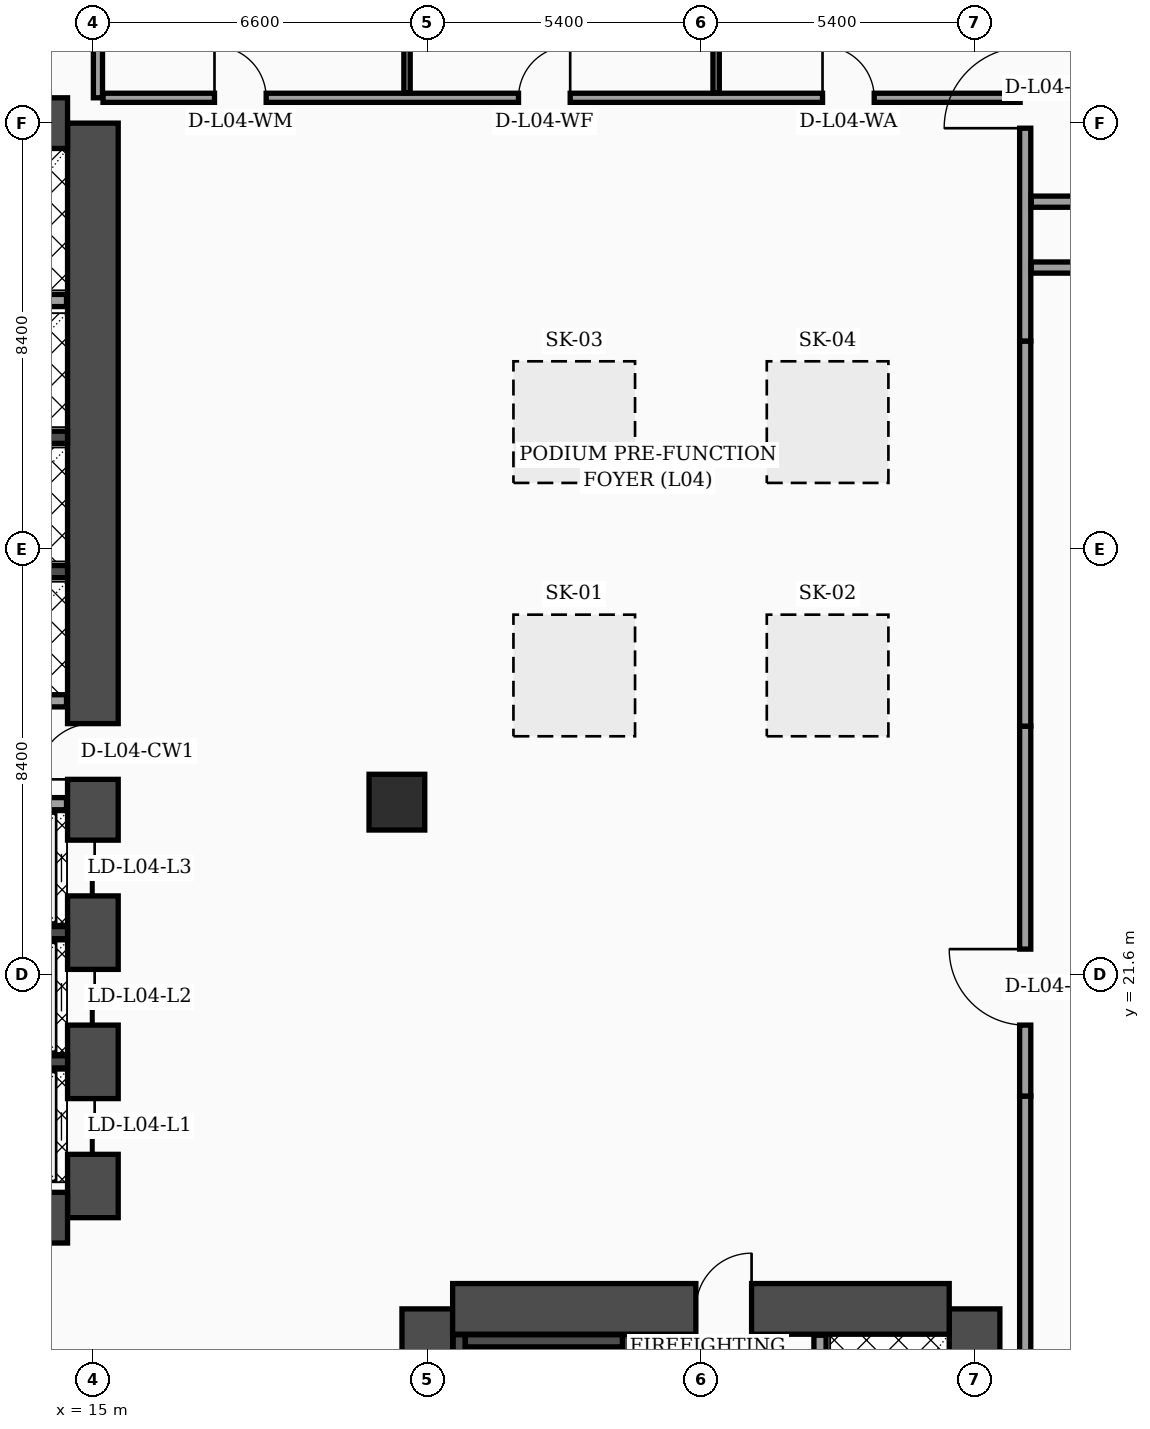
"""IFC4 building model, lengths in metres.
Left out: names, types, materials, properties, quantities, classifications, styles, units other than length and angle.
Written with IfcOpenShell. Run it as: python <this file> out.ifc"""

import sys

from ifc_helpers import new_model, si_unit, direction, frame, frame_2d, origin, origin_2d, place, context, subcontext, project, spatial, rectangle, hollow_rectangle, extrude, element, fill, save


model = new_model("IFC4")
c1 = context("Model", 3, precision=1e-05, world=origin(), true_north=direction((0.0, 1.0)))
c2 = subcontext(c1, "Body", "Model", "MODEL_VIEW")
j1 = project(units=[si_unit("LENGTHUNIT", "METRE"), si_unit("PLANEANGLEUNIT", "RADIAN")], contexts=[c1])
p1 = place(None, origin())
s1 = spatial("IfcSite", under=j1, at=p1, CompositionType="ELEMENT")
p2 = place(p1, origin())
s2 = spatial("IfcBuilding", under=s1, at=p2, CompositionType="ELEMENT")
p3 = place(p2, frame((0.0, 0.0, 22.0)))
s3 = spatial("IfcBuildingStorey", under=s2, at=p3, CompositionType="ELEMENT", Elevation=22.0)
p4 = place(p3, frame((15.0, 16.8, 0.0), z_axis=(0.0, 0.0, 1.0), x_axis=(0.0, 1.0, 0.0)))
e1 = element("IfcWall", 1, at=p4, inside=s3, PredefinedType="SHEAR", context=c2, shape_type="SweptSolid", body=[
    extrude(rectangle(XDim=21.6, YDim=1.0, at=frame_2d((10.8, 0.0))), origin(), (0.0, 0.0, 1.0), 4.76),
])
p5 = place(p4, frame((8.65, 0.0, 0.0)))
e2 = element("IfcOpeningElement", 2, at=p5, cuts=e1, PredefinedType="OPENING", context=c2, shape_type="SweptSolid", body=[
    extrude(rectangle(XDim=1.1, YDim=2.2, at=frame_2d((0.55, 1.1))), frame((0.0, 0.51, 0.0), z_axis=(0.0, -1.0, 0.0), x_axis=(1.0, 0.0, 0.0)), (0.0, 0.0, 1.0), 1.02),
])
p6 = place(p4, frame((1.25, 0.0, 0.0)))
e3 = element("IfcOpeningElement", 3, at=p6, cuts=e1, PredefinedType="OPENING", context=c2, shape_type="SweptSolid", body=[
    extrude(rectangle(XDim=1.1, YDim=2.2, at=frame_2d((0.55, 1.1))), frame((0.0, 0.51, 0.0), z_axis=(0.0, -1.0, 0.0), x_axis=(1.0, 0.0, 0.0)), (0.0, 0.0, 1.0), 1.02),
])
p7 = place(p4, frame((3.8, 0.0, 0.0)))
e4 = element("IfcOpeningElement", 4, at=p7, cuts=e1, PredefinedType="OPENING", context=c2, shape_type="SweptSolid", body=[
    extrude(rectangle(XDim=1.1, YDim=2.2, at=frame_2d((0.55, 1.1))), frame((0.0, 0.51, 0.0), z_axis=(0.0, -1.0, 0.0), x_axis=(1.0, 0.0, 0.0)), (0.0, 0.0, 1.0), 1.02),
])
p8 = place(p4, frame((6.35, 0.0, 0.0)))
e5 = element("IfcOpeningElement", 5, at=p8, cuts=e1, PredefinedType="OPENING", context=c2, shape_type="SweptSolid", body=[
    extrude(rectangle(XDim=1.1, YDim=2.2, at=frame_2d((0.55, 1.1))), frame((0.0, 0.51, 0.0), z_axis=(0.0, -1.0, 0.0), x_axis=(1.0, 0.0, 0.0)), (0.0, 0.0, 1.0), 1.02),
])
for number, where, z_axis, x_axis in (
    (6, (4.7, 38.4, 0.0), (0.0, 0.0, 1.0), (1.0, 0.0, 0.0)),
    (7, (4.7, 16.8, 0.0), (0.0, 0.0, 1.0), (1.0, 0.0, 0.0)),
):
    element("IfcWall", number, at=place(p3, frame(where, z_axis=z_axis, x_axis=x_axis)), inside=s3, PredefinedType="SHEAR", context=c2, shape_type="SweptSolid", body=[
        extrude(rectangle(XDim=9.8, YDim=1.0, at=frame_2d((4.9, 0.0))), origin(), (0.0, 0.0, 1.0), 4.76),
    ])
for number, where, z_axis, x_axis in (
    (8, (21.6, 4.6, 0.0), (0.0, 0.0, 1.0), (0.0, 1.0, 0.0)),
    (9, (32.4, 4.6, 0.0), (0.0, 0.0, 1.0), (0.0, 1.0, 0.0)),
):
    element("IfcWall", number, at=place(p3, frame(where, z_axis=z_axis, x_axis=x_axis)), inside=s3, PredefinedType="SHEAR", context=c2, shape_type="SweptSolid", body=[
        extrude(rectangle(XDim=10.4, YDim=1.0, at=frame_2d((5.2, 0.0))), origin(), (0.0, 0.0, 1.0), 4.76),
    ])
p9 = place(p3, frame((22.1, 15.0, 0.0), z_axis=(0.0, 0.0, 1.0), x_axis=(1.0, 0.0, 0.0)))
e10 = element("IfcWall", 10, at=p9, inside=s3, PredefinedType="SHEAR", context=c2, shape_type="SweptSolid", body=[
    extrude(rectangle(XDim=9.8, YDim=1.0, at=frame_2d((4.9, 0.0))), origin(), (0.0, 0.0, 1.0), 4.76),
])
p10 = place(p9, frame((4.8, 0.0, 0.0)))
e11 = element("IfcOpeningElement", 11, at=p10, cuts=e10, PredefinedType="OPENING", context=c2, shape_type="SweptSolid", body=[
    extrude(rectangle(XDim=1.1, YDim=2.2, at=frame_2d((0.55, 1.1))), frame((0.0, 0.51, 0.0), z_axis=(0.0, -1.0, 0.0), x_axis=(1.0, 0.0, 0.0)), (0.0, 0.0, 1.0), 1.02),
])
p11 = place(p3, frame((22.23, 5.1, 0.0), z_axis=(0.0, 0.0, 1.0), x_axis=(0.0, 1.0, 0.0)))
e12 = element("IfcWall", 12, at=p11, inside=s3, PredefinedType="SOLIDWALL", context=c2, shape_type="SweptSolid", body=[
    extrude(rectangle(XDim=9.39, YDim=0.24, at=frame_2d((4.695, 0.0))), origin(), (0.0, 0.0, 1.0), 4.76),
])
p12 = place(p3, frame((25.57, 5.1, 0.0), z_axis=(0.0, 0.0, 1.0), x_axis=(0.0, 1.0, 0.0)))
e13 = element("IfcWall", 13, at=p12, inside=s3, PredefinedType="SOLIDWALL", context=c2, shape_type="SweptSolid", body=[
    extrude(rectangle(XDim=9.39, YDim=0.24, at=frame_2d((4.695, 0.0))), origin(), (0.0, 0.0, 1.0), 4.76),
])
p13 = place(p12, frame((0.35, 0.0, 0.0)))
e14 = element("IfcOpeningElement", 14, at=p13, cuts=e13, PredefinedType="OPENING", context=c2, shape_type="SweptSolid", body=[
    extrude(rectangle(XDim=1.15, YDim=2.2, at=frame_2d((0.575, 1.1))), frame((0.0, 0.13, 0.0), z_axis=(0.0, -1.0, 0.0), x_axis=(1.0, 0.0, 0.0)), (0.0, 0.0, 1.0), 0.26),
])
p14 = place(p3, frame((22.35, 14.37, 0.0), z_axis=(0.0, 0.0, 1.0), x_axis=(1.0, 0.0, 0.0)))
e15 = element("IfcWall", 15, at=p14, inside=s3, PredefinedType="SOLIDWALL", context=c2, shape_type="SweptSolid", body=[
    extrude(rectangle(XDim=3.1, YDim=0.24, at=frame_2d((1.55, 0.0))), origin(), (0.0, 0.0, 1.0), 4.76),
])
for number, where, z_axis, x_axis in (
    (16, (12.18, 19.875, 0.0), (0.0, 0.0, 1.0), (1.0, 0.0, 0.0)),
    (17, (12.18, 22.425, 0.0), (0.0, 0.0, 1.0), (1.0, 0.0, 0.0)),
    (18, (12.18, 29.55, 0.0), (0.0, 0.0, 1.0), (1.0, 0.0, 0.0)),
    (19, (12.18, 32.2, 0.0), (0.0, 0.0, 1.0), (1.0, 0.0, 0.0)),
):
    element("IfcWall", number, at=place(p3, frame(where, z_axis=z_axis, x_axis=x_axis)), inside=s3, PredefinedType="SOLIDWALL", context=c2, shape_type="SweptSolid", body=[
        extrude(rectangle(XDim=2.32, YDim=0.24, at=frame_2d((1.16, 0.0))), origin(), (0.0, 0.0, 1.0), 4.76),
    ])
p15 = place(p3, frame((21.0, 25.0, 0.0), z_axis=(0.0, 0.0, 1.0), x_axis=(1.0, 0.0, 0.0)))
e20 = element("IfcColumn", 20, at=p15, inside=s3, PredefinedType="COLUMN", context=c2, shape_type="SweptSolid", body=[
    extrude(hollow_rectangle(XDim=1.1, YDim=1.1, WallThickness=0.045, at=origin_2d()), origin(), (0.0, 0.0, 1.0), 4.76),
])
p16 = place(p3, frame((12.15, 24.97, 0.0), z_axis=(0.0, 0.0, 1.0), x_axis=(1.0, 0.0, 0.0)))
e21 = element("IfcWall", 21, at=p16, inside=s3, PredefinedType="SOLIDWALL", context=c2, shape_type="SweptSolid", body=[
    extrude(rectangle(XDim=2.33, YDim=0.24, at=frame_2d((1.165, 0.0))), origin(), (0.0, 0.0, 1.0), 3.94),
])
p17 = place(p3, frame((12.25, 27.0, 0.0), z_axis=(0.0, 0.0, 1.0), x_axis=(1.0, 0.0, 0.0)))
e22 = element("IfcWall", 22, at=p17, inside=s3, PredefinedType="SOLIDWALL", context=c2, shape_type="SweptSolid", body=[
    extrude(rectangle(XDim=2.23, YDim=0.24, at=frame_2d((1.115, 0.0))), origin(), (0.0, 0.0, 1.0), 4.76),
])
p18 = place(p3, frame((9.66, 34.9, 0.0), z_axis=(0.0, 0.0, 1.0), x_axis=(1.0, 0.0, 0.0)))
e23 = element("IfcWall", 23, at=p18, inside=s3, PredefinedType="SOLIDWALL", context=c2, shape_type="SweptSolid", body=[
    extrude(rectangle(XDim=4.82, YDim=0.24, at=frame_2d((2.41, 0.0))), origin(), (0.0, 0.0, 1.0), 4.76),
])
p19 = place(p3, frame((29.35, 5.12, 0.0), z_axis=(0.0, 0.0, 1.0), x_axis=(0.0, 1.0, 0.0)))
e24 = element("IfcWall", 24, at=p19, inside=s3, PredefinedType="SOLIDWALL", context=c2, shape_type="SweptSolid", body=[
    extrude(rectangle(XDim=9.36, YDim=0.24, at=frame_2d((4.68, 0.0))), origin(), (0.0, 0.0, 1.0), 4.76),
])
p20 = place(p19, frame((0.55, 0.0, 0.0)))
e25 = element("IfcOpeningElement", 25, at=p20, cuts=e24, PredefinedType="OPENING", context=c2, shape_type="SweptSolid", body=[
    extrude(rectangle(XDim=1.3, YDim=2.35, at=frame_2d((0.65, 1.175))), frame((0.0, 0.13, 0.0), z_axis=(0.0, -1.0, 0.0), x_axis=(1.0, 0.0, 0.0)), (0.0, 0.0, 1.0), 0.26),
])
p21 = place(p3, frame((15.2, 38.9, 0.0), z_axis=(0.0, 0.0, 1.0), x_axis=(1.0, 0.0, 0.0)))
e26 = element("IfcWall", 26, at=p21, inside=s3, PredefinedType="PARTITIONING", context=c2, shape_type="SweptSolid", body=[
    extrude(rectangle(XDim=18.1, YDim=0.18, at=frame_2d((9.05, 0.0))), origin(), (0.0, 0.0, 1.0), 3.94),
])
p22 = place(p21, frame((2.2, 0.0, 0.0)))
e27 = element("IfcOpeningElement", 27, at=p22, cuts=e26, PredefinedType="OPENING", context=c2, shape_type="SweptSolid", body=[
    extrude(rectangle(XDim=1.02, YDim=2.2, at=frame_2d((0.51, 1.1))), frame((0.0, 0.1, 0.0), z_axis=(0.0, -1.0, 0.0), x_axis=(1.0, 0.0, 0.0)), (0.0, 0.0, 1.0), 0.2),
])
p23 = place(p21, frame((8.2, 0.0, 0.0)))
e28 = element("IfcOpeningElement", 28, at=p23, cuts=e26, PredefinedType="OPENING", context=c2, shape_type="SweptSolid", body=[
    extrude(rectangle(XDim=1.02, YDim=2.2, at=frame_2d((0.51, 1.1))), frame((0.0, 0.1, 0.0), z_axis=(0.0, -1.0, 0.0), x_axis=(1.0, 0.0, 0.0)), (0.0, 0.0, 1.0), 0.2),
])
p24 = place(p21, frame((14.2, 0.0, 0.0)))
e29 = element("IfcOpeningElement", 29, at=p24, cuts=e26, PredefinedType="OPENING", context=c2, shape_type="SweptSolid", body=[
    extrude(rectangle(XDim=1.02, YDim=2.2, at=frame_2d((0.51, 1.1))), frame((0.0, 0.1, 0.0), z_axis=(0.0, -1.0, 0.0), x_axis=(1.0, 0.0, 0.0)), (0.0, 0.0, 1.0), 0.2),
])
p25 = place(p3, frame((15.1, 38.9, 0.0), z_axis=(0.0, 0.0, 1.0), x_axis=(0.0, 1.0, 0.0)))
e30 = element("IfcWall", 30, at=p25, inside=s3, PredefinedType="PARTITIONING", context=c2, shape_type="SweptSolid", body=[
    extrude(rectangle(XDim=6.4, YDim=0.18, at=frame_2d((3.2, 0.0))), origin(), (0.0, 0.0, 1.0), 3.94),
])
p26 = place(p3, frame((21.2, 39.0, 0.0), z_axis=(0.0, 0.0, 1.0), x_axis=(0.0, 1.0, 0.0)))
e31 = element("IfcWall", 31, at=p26, inside=s3, PredefinedType="PARTITIONING", context=c2, shape_type="SweptSolid", body=[
    extrude(rectangle(XDim=6.2, YDim=0.125, at=frame_2d((3.1, 0.0))), origin(), (0.0, 0.0, 1.0), 3.94),
])
p27 = place(p3, frame((27.3, 39.0, 0.0), z_axis=(0.0, 0.0, 1.0), x_axis=(0.0, 1.0, 0.0)))
e32 = element("IfcWall", 32, at=p27, inside=s3, PredefinedType="PARTITIONING", context=c2, shape_type="SweptSolid", body=[
    extrude(rectangle(XDim=6.2, YDim=0.125, at=frame_2d((3.1, 0.0))), origin(), (0.0, 0.0, 1.0), 4.76),
])
p28 = place(p3, frame((33.4, 13.8, 0.0), z_axis=(0.0, 0.0, 1.0), x_axis=(0.0, 1.0, 0.0)))
e33 = element("IfcWall", 33, at=p28, inside=s3, PredefinedType="SOLIDWALL", context=c2, shape_type="SweptSolid", body=[
    extrude(rectangle(XDim=5.4, YDim=0.22, at=frame_2d((2.7, 0.0))), origin(), (0.0, 0.0, 1.0), 1.89),
])
p29 = place(p3, frame((33.4, 19.2, 0.0), z_axis=(0.0, 0.0, 1.0), x_axis=(0.0, 1.0, 0.0)))
e34 = element("IfcWall", 34, at=p29, inside=s3, PredefinedType="SOLIDWALL", context=c2, shape_type="SweptSolid", body=[
    extrude(rectangle(XDim=7.3, YDim=0.22, at=frame_2d((3.65, 0.0))), origin(), (0.0, 0.0, 1.0), 4.76),
])
p30 = place(p29, frame((1.4, 0.0, 0.0)))
e35 = element("IfcOpeningElement", 35, at=p30, cuts=e34, PredefinedType="OPENING", context=c2, shape_type="SweptSolid", body=[
    extrude(rectangle(XDim=1.5, YDim=2.22, at=frame_2d((0.75, 1.11))), frame((0.0, 0.12, 0.0), z_axis=(0.0, -1.0, 0.0), x_axis=(1.0, 0.0, 0.0)), (0.0, 0.0, 1.0), 0.24),
])
p31 = place(p3, frame((33.4, 26.5, 0.0), z_axis=(0.0, 0.0, 1.0), x_axis=(0.0, 1.0, 0.0)))
e36 = element("IfcWall", 36, at=p31, inside=s3, PredefinedType="SOLIDWALL", context=c2, shape_type="SweptSolid", body=[
    extrude(rectangle(XDim=7.6, YDim=0.22, at=frame_2d((3.8, 0.0))), origin(), (0.0, 0.0, 1.0), 1.89),
])
p32 = place(p3, frame((33.4, 34.1, 0.0), z_axis=(0.0, 0.0, 1.0), x_axis=(0.0, 1.0, 0.0)))
e37 = element("IfcWall", 37, at=p32, inside=s3, PredefinedType="SOLIDWALL", context=c2, shape_type="SweptSolid", body=[
    extrude(rectangle(XDim=21.34, YDim=0.22, at=frame_2d((10.67, 0.0))), origin(), (0.0, 0.0, 1.0), 3.94),
])
p33 = place(p32, frame((4.2, 0.0, 0.0)))
e38 = element("IfcOpeningElement", 38, at=p33, cuts=e37, PredefinedType="OPENING", context=c2, shape_type="SweptSolid", body=[
    extrude(rectangle(XDim=1.6, YDim=2.35, at=frame_2d((0.8, 1.175))), frame((0.0, 0.12, 0.0), z_axis=(0.0, -1.0, 0.0), x_axis=(1.0, 0.0, 0.0)), (0.0, 0.0, 1.0), 0.24),
])
p34 = place(p3, frame((33.52, 35.55, 0.0), z_axis=(0.0, 0.0, 1.0), x_axis=(1.0, 0.0, 0.0)))
e39 = element("IfcWall", 39, at=p34, inside=s3, PredefinedType="SOLIDWALL", context=c2, shape_type="SweptSolid", body=[
    extrude(rectangle(XDim=42.36, YDim=0.22, at=frame_2d((21.18, 0.0))), origin(), (0.0, 0.0, 1.0), 1.89),
])
p35 = place(p3, frame((33.52, 36.85, 0.0), z_axis=(0.0, 0.0, 1.0), x_axis=(1.0, 0.0, 0.0)))
e40 = element("IfcWall", 40, at=p35, inside=s3, PredefinedType="SOLIDWALL", context=c2, shape_type="SweptSolid", body=[
    extrude(rectangle(XDim=42.36, YDim=0.22, at=frame_2d((21.18, 0.0))), origin(), (0.0, 0.0, 1.0), 3.94),
])
p36 = place(p3, frame((0.0, 0.0, -0.45)))
p37 = place(p36, frame((24.5, 27.5, 0.0)))
p38 = place(p37, frame((0.0, 0.0, 0.4)))
e41 = element("IfcWindow", 41, at=p38, inside=s3, PartitioningType="SINGLE_PANEL", PredefinedType="SKYLIGHT", context=c2, shape_type="SweptSolid", body=[
    extrude(rectangle(XDim=2.4, YDim=2.4, at=origin_2d()), origin(), (0.0, 0.0, 1.0), 0.05),
])
p39 = place(p36, frame((29.5, 27.5, 0.0)))
p40 = place(p39, frame((0.0, 0.0, 0.4)))
e42 = element("IfcWindow", 42, at=p40, inside=s3, PartitioningType="SINGLE_PANEL", PredefinedType="SKYLIGHT", context=c2, shape_type="SweptSolid", body=[
    extrude(rectangle(XDim=2.4, YDim=2.4, at=origin_2d()), origin(), (0.0, 0.0, 1.0), 0.05),
])
p41 = place(p36, frame((24.5, 32.5, 0.0)))
p42 = place(p41, frame((0.0, 0.0, 0.4)))
e43 = element("IfcWindow", 43, at=p42, inside=s3, PartitioningType="SINGLE_PANEL", PredefinedType="SKYLIGHT", context=c2, shape_type="SweptSolid", body=[
    extrude(rectangle(XDim=2.4, YDim=2.4, at=origin_2d()), origin(), (0.0, 0.0, 1.0), 0.05),
])
p43 = place(p36, frame((29.5, 32.5, 0.0)))
p44 = place(p43, frame((0.0, 0.0, 0.4)))
e44 = element("IfcWindow", 44, at=p44, inside=s3, PartitioningType="SINGLE_PANEL", PredefinedType="SKYLIGHT", context=c2, shape_type="SweptSolid", body=[
    extrude(rectangle(XDim=2.4, YDim=2.4, at=origin_2d()), origin(), (0.0, 0.0, 1.0), 0.05),
])
p45 = place(p22, origin())
e45 = element("IfcDoor", 45, at=p45, inside=s3, OperationType="SINGLE_SWING_LEFT", PredefinedType="DOOR", context=c2, shape_type="SweptSolid", body=[
    extrude(rectangle(XDim=1.02, YDim=2.2, at=frame_2d((0.51, 1.1))), frame((0.0, 0.025, 0.0), z_axis=(0.0, -1.0, 0.0), x_axis=(1.0, 0.0, 0.0)), (0.0, 0.0, 1.0), 0.05),
])
fill(e27, e45)
p46 = place(p23, origin())
e46 = element("IfcDoor", 46, at=p46, inside=s3, OperationType="SINGLE_SWING_RIGHT", PredefinedType="DOOR", context=c2, shape_type="SweptSolid", body=[
    extrude(rectangle(XDim=1.02, YDim=2.2, at=frame_2d((0.51, 1.1))), frame((0.0, 0.025, 0.0), z_axis=(0.0, -1.0, 0.0), x_axis=(1.0, 0.0, 0.0)), (0.0, 0.0, 1.0), 0.05),
])
fill(e28, e46)
p47 = place(p24, origin())
e47 = element("IfcDoor", 47, at=p47, inside=s3, OperationType="SINGLE_SWING_LEFT", PredefinedType="DOOR", context=c2, shape_type="SweptSolid", body=[
    extrude(rectangle(XDim=1.02, YDim=2.2, at=frame_2d((0.51, 1.1))), frame((0.0, 0.025, 0.0), z_axis=(0.0, -1.0, 0.0), x_axis=(1.0, 0.0, 0.0)), (0.0, 0.0, 1.0), 0.05),
])
fill(e29, e47)
p48 = place(p30, origin())
e48 = element("IfcDoor", 48, at=p48, inside=s3, OperationType="SINGLE_SWING_RIGHT", PredefinedType="DOOR", context=c2, shape_type="SweptSolid", body=[
    extrude(rectangle(XDim=1.5, YDim=2.22, at=frame_2d((0.75, 1.11))), frame((0.0, 0.025, 0.0), z_axis=(0.0, -1.0, 0.0), x_axis=(1.0, 0.0, 0.0)), (0.0, 0.0, 1.0), 0.05),
])
fill(e35, e48)
p49 = place(p33, origin())
e49 = element("IfcDoor", 49, at=p49, inside=s3, OperationType="SINGLE_SWING_LEFT", PredefinedType="DOOR", context=c2, shape_type="SweptSolid", body=[
    extrude(rectangle(XDim=1.6, YDim=2.35, at=frame_2d((0.8, 1.175))), frame((0.0, 0.025, 0.0), z_axis=(0.0, -1.0, 0.0), x_axis=(1.0, 0.0, 0.0)), (0.0, 0.0, 1.0), 0.05),
])
fill(e38, e49)
p50 = place(p5, origin())
e50 = element("IfcDoor", 50, at=p50, inside=s3, OperationType="SINGLE_SWING_LEFT", PredefinedType="DOOR", context=c2, shape_type="SweptSolid", body=[
    extrude(rectangle(XDim=1.1, YDim=2.2, at=frame_2d((0.55, 1.1))), frame((0.0, 0.025, 0.0), z_axis=(0.0, -1.0, 0.0), x_axis=(1.0, 0.0, 0.0)), (0.0, 0.0, 1.0), 0.05),
])
fill(e2, e50)
p51 = place(p6, origin())
e51 = element("IfcDoor", 51, at=p51, inside=s3, OperationType="DOUBLE_DOOR_SLIDING", PredefinedType="DOOR", context=c2, shape_type="SweptSolid", body=[
    extrude(rectangle(XDim=1.1, YDim=2.2, at=frame_2d((0.55, 1.1))), frame((0.0, 0.025, 0.0), z_axis=(0.0, -1.0, 0.0), x_axis=(1.0, 0.0, 0.0)), (0.0, 0.0, 1.0), 0.05),
])
fill(e3, e51)
p52 = place(p7, origin())
e52 = element("IfcDoor", 52, at=p52, inside=s3, OperationType="DOUBLE_DOOR_SLIDING", PredefinedType="DOOR", context=c2, shape_type="SweptSolid", body=[
    extrude(rectangle(XDim=1.1, YDim=2.2, at=frame_2d((0.55, 1.1))), frame((0.0, 0.025, 0.0), z_axis=(0.0, -1.0, 0.0), x_axis=(1.0, 0.0, 0.0)), (0.0, 0.0, 1.0), 0.05),
])
fill(e4, e52)
p53 = place(p8, origin())
e53 = element("IfcDoor", 53, at=p53, inside=s3, OperationType="DOUBLE_DOOR_SLIDING", PredefinedType="DOOR", context=c2, shape_type="SweptSolid", body=[
    extrude(rectangle(XDim=1.1, YDim=2.2, at=frame_2d((0.55, 1.1))), frame((0.0, 0.025, 0.0), z_axis=(0.0, -1.0, 0.0), x_axis=(1.0, 0.0, 0.0)), (0.0, 0.0, 1.0), 0.05),
])
fill(e5, e53)
p54 = place(p10, origin())
e54 = element("IfcDoor", 54, at=p54, inside=s3, OperationType="SINGLE_SWING_RIGHT", PredefinedType="DOOR", context=c2, shape_type="SweptSolid", body=[
    extrude(rectangle(XDim=1.1, YDim=2.2, at=frame_2d((0.55, 1.1))), frame((0.0, 0.025, 0.0), z_axis=(0.0, -1.0, 0.0), x_axis=(1.0, 0.0, 0.0)), (0.0, 0.0, 1.0), 0.05),
])
fill(e11, e54)
save(model, sys.argv[1])
